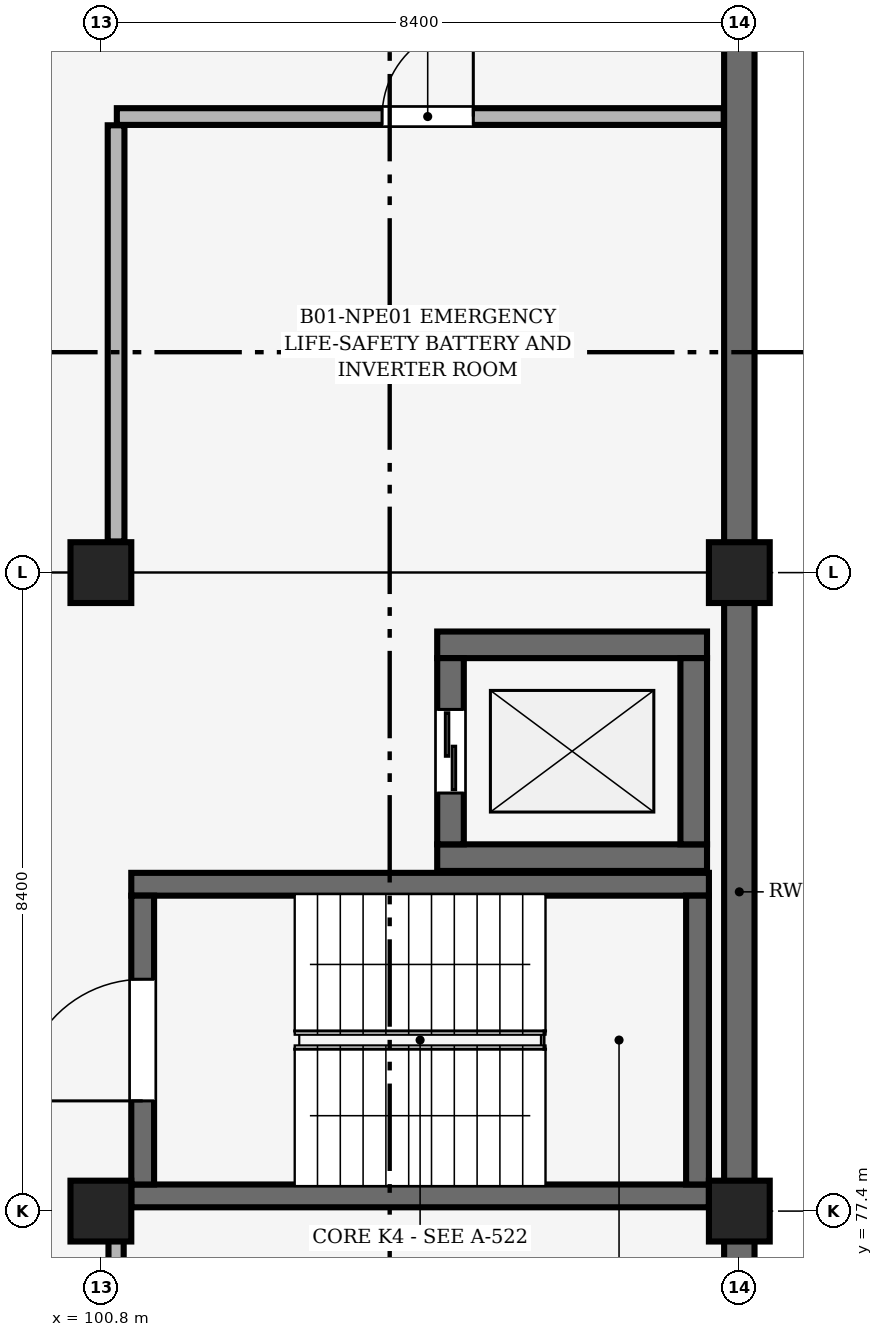
"""IFC4 building model, lengths in metres.
Left out: names, types, materials, properties, quantities, classifications, styles, units other than length and angle.
Written with IfcOpenShell. Run it as: python <this file> out.ifc"""

import sys

from ifc_helpers import new_model, si_unit, direction, frame, frame_2d, origin, origin_2d, place, context, subcontext, project, spatial, rectangle, extrude, element, fill, save


model = new_model("IFC4")
c1 = context("Model", 3, precision=1e-05, world=origin(), true_north=direction((0.0, 1.0)))
c2 = subcontext(c1, "Body", "Model", "MODEL_VIEW")
j1 = project(units=[si_unit("LENGTHUNIT", "METRE"), si_unit("PLANEANGLEUNIT", "RADIAN")], contexts=[c1])
p1 = place(None, origin())
s1 = spatial("IfcSite", under=j1, at=p1, CompositionType="ELEMENT")
p2 = place(p1, origin())
s2 = spatial("IfcBuilding", under=s1, at=p2, CompositionType="ELEMENT")
p3 = place(p2, frame((0.0, 0.0, -4.2)))
s3 = spatial("IfcBuildingStorey", under=s2, at=p3, CompositionType="ELEMENT", Elevation=-4.2)
for number, where, z_axis, x_axis in (
    (1, (100.8, 77.4, 0.0), (0.0, 0.0, 1.0), (1.0, 0.0, 0.0)),
    (2, (100.8, 85.8, 0.0), (0.0, 0.0, 1.0), (1.0, 0.0, 0.0)),
    (3, (109.2, 77.4, 0.0), (0.0, 0.0, 1.0), (1.0, 0.0, 0.0)),
    (4, (109.2, 85.8, 0.0), (0.0, 0.0, 1.0), (1.0, 0.0, 0.0)),
):
    element("IfcColumn", number, at=place(p3, frame(where, z_axis=z_axis, x_axis=x_axis)), inside=s3, PredefinedType="COLUMN", context=c2, shape_type="SweptSolid", body=[
        extrude(rectangle(XDim=0.8, YDim=0.8, at=origin_2d()), origin(), (0.0, 0.0, 1.0), 4.2),
    ])
p4 = place(p3, frame((109.2, 69.375, 0.0), z_axis=(0.0, 0.0, 1.0), x_axis=(0.0, 1.0, 0.0)))
e5 = element("IfcWall", 5, at=p4, inside=s3, PredefinedType="SHEAR", context=c2, shape_type="SweptSolid", body=[
    extrude(rectangle(XDim=7.65, YDim=0.4, at=frame_2d((3.825, 0.0))), origin(), (0.0, 0.0, 1.0), 2.95),
])
p5 = place(p3, frame((109.2, 77.775, 0.0), z_axis=(0.0, 0.0, 1.0), x_axis=(0.0, 1.0, 0.0)))
e6 = element("IfcWall", 6, at=p5, inside=s3, PredefinedType="SHEAR", context=c2, shape_type="SweptSolid", body=[
    extrude(rectangle(XDim=7.65, YDim=0.4, at=frame_2d((3.825, 0.0))), origin(), (0.0, 0.0, 1.0), 2.9),
])
p6 = place(p3, frame((109.2, 86.175, 0.0), z_axis=(0.0, 0.0, 1.0), x_axis=(0.0, 1.0, 0.0)))
e7 = element("IfcWall", 7, at=p6, inside=s3, PredefinedType="SHEAR", context=c2, shape_type="SweptSolid", body=[
    extrude(rectangle(XDim=8.25, YDim=0.4, at=frame_2d((4.125, 0.0))), origin(), (0.0, 0.0, 1.0), 2.9),
])
for number, where, z_axis, x_axis in (
    (8, (101.2, 77.6, 0.0), (0.0, 0.0, 1.0), (1.0, 0.0, 0.0)),
    (9, (101.2, 81.7, 0.0), (0.0, 0.0, 1.0), (1.0, 0.0, 0.0)),
):
    element("IfcWall", number, at=place(p3, frame(where, z_axis=z_axis, x_axis=x_axis)), inside=s3, PredefinedType="SHEAR", context=c2, shape_type="SweptSolid", body=[
        extrude(rectangle(XDim=7.6, YDim=0.3, at=frame_2d((3.8, 0.0))), origin(), (0.0, 0.0, 1.0), 4.025),
    ])
p7 = place(p3, frame((101.35, 77.75, 0.0), z_axis=(0.0, 0.0, 1.0), x_axis=(0.0, 1.0, 0.0)))
e10 = element("IfcWall", 10, at=p7, inside=s3, PredefinedType="SHEAR", context=c2, shape_type="SweptSolid", body=[
    extrude(rectangle(XDim=3.8, YDim=0.3, at=frame_2d((1.9, 0.0))), origin(), (0.0, 0.0, 1.0), 4.025),
])
p8 = place(p7, frame((1.1, 0.0, 0.0)))
e11 = element("IfcOpeningElement", 11, at=p8, cuts=e10, PredefinedType="OPENING", context=c2, shape_type="SweptSolid", body=[
    extrude(rectangle(XDim=1.6, YDim=2.2, at=frame_2d((0.8, 1.1))), frame((0.0, 0.16, 0.0), z_axis=(0.0, -1.0, 0.0), x_axis=(1.0, 0.0, 0.0)), (0.0, 0.0, 1.0), 0.32),
])
p9 = place(p3, frame((108.65, 77.75, 0.0), z_axis=(0.0, 0.0, 1.0), x_axis=(0.0, 1.0, 0.0)))
e12 = element("IfcWall", 12, at=p9, inside=s3, PredefinedType="SHEAR", context=c2, shape_type="SweptSolid", body=[
    extrude(rectangle(XDim=3.8, YDim=0.3, at=frame_2d((1.9, 0.0))), origin(), (0.0, 0.0, 1.0), 4.025),
])
for number, where, z_axis, x_axis in (
    (13, (105.225, 82.05, 0.0), (0.0, 0.0, 1.0), (1.0, 0.0, 0.0)),
    (14, (105.225, 84.85, 0.0), (0.0, 0.0, 1.0), (1.0, 0.0, 0.0)),
):
    element("IfcWall", number, at=place(p3, frame(where, z_axis=z_axis, x_axis=x_axis)), inside=s3, PredefinedType="SHEAR", context=c2, shape_type="SweptSolid", body=[
        extrude(rectangle(XDim=3.55, YDim=0.35, at=frame_2d((1.775, 0.0))), origin(), (0.0, 0.0, 1.0), 3.92),
    ])
p10 = place(p3, frame((105.4, 82.225, 0.0), z_axis=(0.0, 0.0, 1.0), x_axis=(0.0, 1.0, 0.0)))
e15 = element("IfcWall", 15, at=p10, inside=s3, PredefinedType="SHEAR", context=c2, shape_type="SweptSolid", body=[
    extrude(rectangle(XDim=2.45, YDim=0.35, at=frame_2d((1.225, 0.0))), origin(), (0.0, 0.0, 1.0), 3.92),
])
p11 = place(p10, frame((0.675, 0.0, 0.0)))
e16 = element("IfcOpeningElement", 16, at=p11, cuts=e15, PredefinedType="OPENING", context=c2, shape_type="SweptSolid", body=[
    extrude(rectangle(XDim=1.1, YDim=2.2, at=frame_2d((0.55, 1.1))), frame((0.0, 0.185, 0.0), z_axis=(0.0, -1.0, 0.0), x_axis=(1.0, 0.0, 0.0)), (0.0, 0.0, 1.0), 0.37),
])
p12 = place(p3, frame((108.6, 82.225, 0.0), z_axis=(0.0, 0.0, 1.0), x_axis=(0.0, 1.0, 0.0)))
e17 = element("IfcWall", 17, at=p12, inside=s3, PredefinedType="SHEAR", context=c2, shape_type="SweptSolid", body=[
    extrude(rectangle(XDim=2.45, YDim=0.35, at=frame_2d((1.225, 0.0))), origin(), (0.0, 0.0, 1.0), 3.92),
])
p13 = place(p3, frame((101.01, 91.8, 0.0), z_axis=(0.0, 0.0, 1.0), x_axis=(1.0, 0.0, 0.0)))
e18 = element("IfcWall", 18, at=p13, inside=s3, PredefinedType="SOLIDWALL", context=c2, shape_type="SweptSolid", body=[
    extrude(rectangle(XDim=7.985, YDim=0.22, at=frame_2d((3.993, 0.0))), origin(), (0.0, 0.0, 1.0), 3.9),
])
p14 = place(p13, frame((3.49, 0.0, 0.0)))
e19 = element("IfcOpeningElement", 19, at=p14, cuts=e18, PredefinedType="OPENING", context=c2, shape_type="SweptSolid", body=[
    extrude(rectangle(XDim=1.2, YDim=2.4, at=frame_2d((0.6, 1.2))), frame((0.0, 0.12, 0.0), z_axis=(0.0, -1.0, 0.0), x_axis=(1.0, 0.0, 0.0)), (0.0, 0.0, 1.0), 0.24),
])
p15 = place(p3, frame((101.0, 86.21, 0.0), z_axis=(0.0, 0.0, 1.0), x_axis=(0.0, 1.0, 0.0)))
e20 = element("IfcWall", 20, at=p15, inside=s3, PredefinedType="SOLIDWALL", context=c2, shape_type="SweptSolid", body=[
    extrude(rectangle(XDim=5.475, YDim=0.22, at=frame_2d((2.738, 0.0))), origin(), (0.0, 0.0, 1.0), 3.25),
])
p16 = place(p3, frame((101.0, 69.41, 0.0), z_axis=(0.0, 0.0, 1.0), x_axis=(0.0, 1.0, 0.0)))
e21 = element("IfcWall", 21, at=p16, inside=s3, PredefinedType="PARTITIONING", context=c2, shape_type="SweptSolid", body=[
    extrude(rectangle(XDim=7.78, YDim=0.2, at=frame_2d((3.89, 0.0))), origin(), (0.0, 0.0, 1.0), 2.7),
])
p17 = place(p16, frame((0.94, 0.0, 0.0)))
e22 = element("IfcOpeningElement", 22, at=p17, cuts=e21, PredefinedType="OPENING", context=c2, shape_type="SweptSolid", body=[
    extrude(rectangle(XDim=1.1, YDim=2.15, at=frame_2d((0.55, 1.075))), frame((0.0, 0.11, 0.0), z_axis=(0.0, -1.0, 0.0), x_axis=(1.0, 0.0, 0.0)), (0.0, 0.0, 1.0), 0.22),
])
p18 = place(p8, origin())
e23 = element("IfcDoor", 23, at=p18, inside=s3, OperationType="DOUBLE_DOOR_SINGLE_SWING", PredefinedType="DOOR", context=c2, shape_type="SweptSolid", body=[
    extrude(rectangle(XDim=1.6, YDim=2.2, at=frame_2d((0.8, 1.1))), frame((0.0, 0.025, 0.0), z_axis=(0.0, -1.0, 0.0), x_axis=(1.0, 0.0, 0.0)), (0.0, 0.0, 1.0), 0.05),
])
fill(e11, e23)
p19 = place(p11, origin())
e24 = element("IfcDoor", 24, at=p19, inside=s3, OperationType="DOUBLE_DOOR_SLIDING", PredefinedType="DOOR", context=c2, shape_type="SweptSolid", body=[
    extrude(rectangle(XDim=1.1, YDim=2.2, at=frame_2d((0.55, 1.1))), frame((0.0, 0.025, 0.0), z_axis=(0.0, -1.0, 0.0), x_axis=(1.0, 0.0, 0.0)), (0.0, 0.0, 1.0), 0.05),
])
fill(e16, e24)
p20 = place(p14, origin())
e25 = element("IfcDoor", 25, at=p20, inside=s3, OperationType="SINGLE_SWING_RIGHT", PredefinedType="DOOR", context=c2, shape_type="SweptSolid", body=[
    extrude(rectangle(XDim=1.2, YDim=2.4, at=frame_2d((0.6, 1.2))), frame((0.0, 0.025, 0.0), z_axis=(0.0, -1.0, 0.0), x_axis=(1.0, 0.0, 0.0)), (0.0, 0.0, 1.0), 0.05),
])
fill(e19, e25)
save(model, sys.argv[1])
